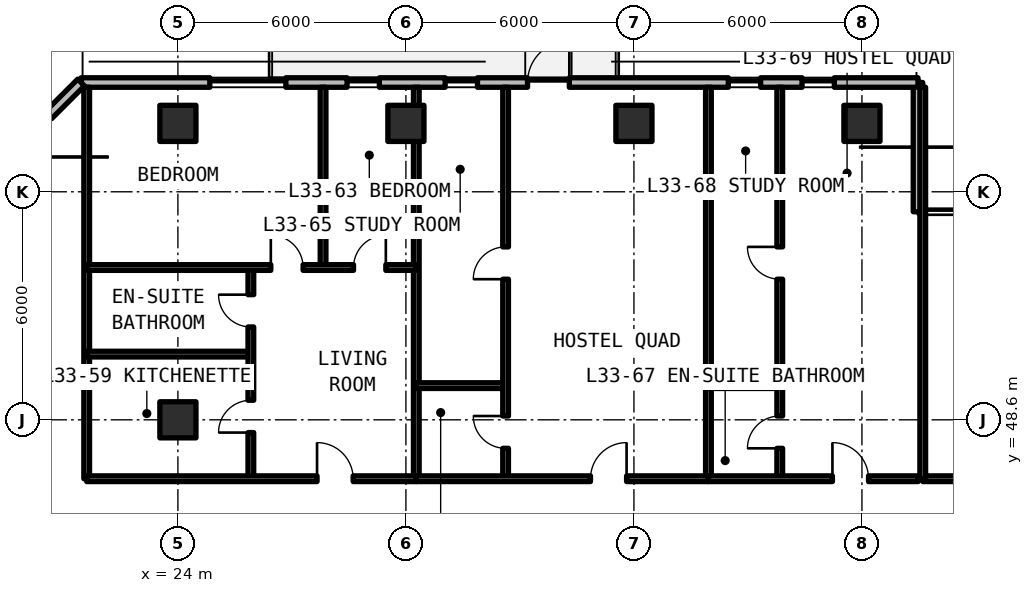
"""IFC4 building model, lengths in metres.
Left out: names, types, materials, properties, quantities, classifications, styles, units other than length and angle.
Written with IfcOpenShell. Run it as: python <this file> out.ifc"""

import sys

from ifc_helpers import new_model, si_unit, direction, frame, frame_2d, origin, origin_2d, place, context, subcontext, project, spatial, rectangle, extrude, element, fill, save


model = new_model("IFC4")
c1 = context("Model", 3, precision=1e-05, world=origin(), true_north=direction((0.0, 1.0)))
c2 = subcontext(c1, "Body", "Model", "MODEL_VIEW")
j1 = project(units=[si_unit("LENGTHUNIT", "METRE"), si_unit("PLANEANGLEUNIT", "RADIAN")], contexts=[c1])
p1 = place(None, origin())
s1 = spatial("IfcSite", under=j1, at=p1, CompositionType="ELEMENT")
p2 = place(p1, origin())
s2 = spatial("IfcBuilding", under=s1, at=p2, CompositionType="ELEMENT")
p3 = place(p2, frame((0.0, 0.0, 119.46)))
s3 = spatial("IfcBuildingStorey", under=s2, at=p3, CompositionType="ELEMENT", Elevation=119.46)
for number, where, z_axis, x_axis in (
    (1, (24.0, 48.6, 0.0), (0.0, 0.0, 1.0), (1.0, 0.0, 0.0)),
    (2, (24.0, 56.4, 0.0), (0.0, 0.0, 1.0), (1.0, 0.0, 0.0)),
    (3, (30.0, 56.4, 0.0), (0.0, 0.0, 1.0), (1.0, 0.0, 0.0)),
    (4, (36.0, 56.4, 0.0), (0.0, 0.0, 1.0), (1.0, 0.0, 0.0)),
    (5, (42.0, 56.4, 0.0), (0.0, 0.0, 1.0), (1.0, 0.0, 0.0)),
):
    element("IfcColumn", number, at=place(p3, frame(where, z_axis=z_axis, x_axis=x_axis)), inside=s3, PredefinedType="COLUMN", context=c2, shape_type="SweptSolid", body=[
        extrude(rectangle(XDim=0.95, YDim=0.95, at=origin_2d()), origin(), (0.0, 0.0, 1.0), 3.63),
    ])
p4 = place(p3, frame((43.475, 54.075, 0.0), z_axis=(0.0, 0.0, 1.0), x_axis=(0.0, 1.0, 0.0)))
e6 = element("IfcWall", 6, at=p4, inside=s3, PredefinedType="SOLIDWALL", context=c2, shape_type="SweptSolid", body=[
    extrude(rectangle(XDim=3.4, YDim=0.25, at=frame_2d((1.7, 0.0))), origin(), (0.0, 0.0, 1.0), 3.35),
])
p5 = place(p3, frame((43.475, 57.475, 0.0), z_axis=(0.0, 0.0, 1.0), x_axis=(-1.0, 0.0, 0.0)))
e7 = element("IfcWall", 7, at=p5, inside=s3, PredefinedType="SOLIDWALL", context=c2, shape_type="SweptSolid", body=[
    extrude(rectangle(XDim=22.023, YDim=0.25, at=frame_2d((11.012, 0.0))), origin(), (0.0, 0.0, 1.0), 3.35),
])
p6 = place(p5, frame((9.175, 0.0, 0.0)))
e8 = element("IfcOpeningElement", 8, at=p6, cuts=e7, PredefinedType="OPENING", context=c2, shape_type="SweptSolid", body=[
    extrude(rectangle(XDim=1.1, YDim=2.15, at=frame_2d((0.55, 1.075))), frame((0.0, 0.135, 0.0), z_axis=(0.0, -1.0, 0.0), x_axis=(1.0, 0.0, 0.0)), (0.0, 0.0, 1.0), 0.27),
])
p7 = place(p5, frame((16.635, 0.0, 0.78)))
e9 = element("IfcOpeningElement", 9, at=p7, cuts=e7, PredefinedType="OPENING", context=c2, shape_type="SweptSolid", body=[
    extrude(rectangle(XDim=2.0, YDim=1.66, at=frame_2d((1.0, 0.83))), frame((0.0, 0.135, 0.0), z_axis=(0.0, -1.0, 0.0), x_axis=(1.0, 0.0, 0.0)), (0.0, 0.0, 1.0), 0.27),
])
p8 = place(p5, frame((14.173, 0.0, 0.78)))
e10 = element("IfcOpeningElement", 10, at=p8, cuts=e7, PredefinedType="OPENING", context=c2, shape_type="SweptSolid", body=[
    extrude(rectangle(XDim=0.85, YDim=1.65, at=frame_2d((0.425, 0.825))), frame((0.0, 0.135, 0.0), z_axis=(0.0, -1.0, 0.0), x_axis=(1.0, 0.0, 0.0)), (0.0, 0.0, 1.0), 0.27),
])
p9 = place(p5, frame((11.592, 0.0, 0.78)))
e11 = element("IfcOpeningElement", 11, at=p9, cuts=e7, PredefinedType="OPENING", context=c2, shape_type="SweptSolid", body=[
    extrude(rectangle(XDim=0.85, YDim=1.65, at=frame_2d((0.425, 0.825))), frame((0.0, 0.135, 0.0), z_axis=(0.0, -1.0, 0.0), x_axis=(1.0, 0.0, 0.0)), (0.0, 0.0, 1.0), 0.27),
])
p10 = place(p5, frame((4.141, 0.0, 0.78)))
e12 = element("IfcOpeningElement", 12, at=p10, cuts=e7, PredefinedType="OPENING", context=c2, shape_type="SweptSolid", body=[
    extrude(rectangle(XDim=0.85, YDim=1.65, at=frame_2d((0.425, 0.825))), frame((0.0, 0.135, 0.0), z_axis=(0.0, -1.0, 0.0), x_axis=(1.0, 0.0, 0.0)), (0.0, 0.0, 1.0), 0.27),
])
p11 = place(p5, frame((2.201, 0.0, 0.78)))
e13 = element("IfcOpeningElement", 13, at=p11, cuts=e7, PredefinedType="OPENING", context=c2, shape_type="SweptSolid", body=[
    extrude(rectangle(XDim=0.85, YDim=1.65, at=frame_2d((0.425, 0.825))), frame((0.0, 0.135, 0.0), z_axis=(0.0, -1.0, 0.0), x_axis=(1.0, 0.0, 0.0)), (0.0, 0.0, 1.0), 0.27),
])
p12 = place(p3, frame((21.452, 57.475, 0.0), z_axis=(0.0, 0.0, 1.0), x_axis=(-0.707106781187, -0.707106781187, 0.0)))
e14 = element("IfcWall", 14, at=p12, inside=s3, PredefinedType="SOLIDWALL", context=c2, shape_type="SweptSolid", body=[
    extrude(rectangle(XDim=5.836, YDim=0.25, at=frame_2d((2.918, 0.0))), origin(), (0.0, 0.0, 1.0), 3.35),
])
p13 = place(p12, frame((1.218, 0.0, 0.78)))
e15 = element("IfcOpeningElement", 15, at=p13, cuts=e14, PredefinedType="OPENING", context=c2, shape_type="SweptSolid", body=[
    extrude(rectangle(XDim=3.4, YDim=1.66, at=frame_2d((1.7, 0.83))), frame((0.0, 0.135, 0.0), z_axis=(0.0, -1.0, 0.0), x_axis=(1.0, 0.0, 0.0)), (0.0, 0.0, 1.0), 0.27),
])
p14 = place(p3, frame((43.6, 47.05, 0.0), z_axis=(0.0, 0.0, 1.0), x_axis=(1.0, 0.0, 0.0)))
e16 = element("IfcWall", 16, at=p14, inside=s3, PredefinedType="SOLIDWALL", context=c2, shape_type="SweptSolid", body=[
    extrude(rectangle(XDim=8.4, YDim=0.15, at=frame_2d((4.2, 0.0))), origin(), (0.0, 0.0, 1.0), 2.57),
])
p15 = place(p14, frame((3.65, 0.0, 0.0)))
e17 = element("IfcOpeningElement", 17, at=p15, cuts=e16, PredefinedType="OPENING", context=c2, shape_type="SweptSolid", body=[
    extrude(rectangle(XDim=1.1, YDim=2.15, at=frame_2d((0.55, 1.075))), frame((0.0, 0.085, 0.0), z_axis=(0.0, -1.0, 0.0), x_axis=(1.0, 0.0, 0.0)), (0.0, 0.0, 1.0), 0.17),
])
for number, where, z_axis, x_axis in (
    (18, (43.6, 47.05, 0.0), (0.0, 0.0, 1.0), (0.0, 1.0, 0.0)),
    (19, (21.6, 47.05, 0.0), (0.0, 0.0, 1.0), (0.0, 1.0, 0.0)),
    (20, (30.273, 47.05, 0.0), (0.0, 0.0, 1.0), (0.0, 1.0, 0.0)),
):
    element("IfcWall", number, at=place(p3, frame(where, z_axis=z_axis, x_axis=x_axis)), inside=s3, PredefinedType="SOLIDWALL", context=c2, shape_type="SweptSolid", body=[
        extrude(rectangle(XDim=10.3, YDim=0.15, at=frame_2d((5.15, 0.0))), origin(), (0.0, 0.0, 1.0), 2.57),
    ])
p16 = place(p3, frame((21.6, 50.329, 0.0), z_axis=(0.0, 0.0, 1.0), x_axis=(1.0, 0.0, 0.0)))
e21 = element("IfcWall", 21, at=p16, inside=s3, PredefinedType="PARTITIONING", context=c2, shape_type="SweptSolid", body=[
    extrude(rectangle(XDim=4.32, YDim=0.15, at=frame_2d((2.16, 0.0))), origin(), (0.0, 0.0, 1.0), 2.57),
])
p17 = place(p3, frame((25.92, 47.05, 0.0), z_axis=(0.0, 0.0, 1.0), x_axis=(0.0, 1.0, 0.0)))
e22 = element("IfcWall", 22, at=p17, inside=s3, PredefinedType="PARTITIONING", context=c2, shape_type="SweptSolid", body=[
    extrude(rectangle(XDim=5.557, YDim=0.15, at=frame_2d((2.779, 0.0))), origin(), (0.0, 0.0, 1.0), 2.57),
])
p18 = place(p17, frame((1.214, 0.0, 0.0)))
e23 = element("IfcOpeningElement", 23, at=p18, cuts=e22, PredefinedType="OPENING", context=c2, shape_type="SweptSolid", body=[
    extrude(rectangle(XDim=0.85, YDim=2.1, at=frame_2d((0.425, 1.05))), frame((0.0, 0.085, 0.0), z_axis=(0.0, -1.0, 0.0), x_axis=(1.0, 0.0, 0.0)), (0.0, 0.0, 1.0), 0.17),
])
p19 = place(p17, frame((3.993, 0.0, 0.0)))
e24 = element("IfcOpeningElement", 24, at=p19, cuts=e22, PredefinedType="OPENING", context=c2, shape_type="SweptSolid", body=[
    extrude(rectangle(XDim=0.85, YDim=2.1, at=frame_2d((0.425, 1.05))), frame((0.0, 0.085, 0.0), z_axis=(0.0, -1.0, 0.0), x_axis=(1.0, 0.0, 0.0)), (0.0, 0.0, 1.0), 0.17),
])
p20 = place(p3, frame((27.82, 52.607, 0.0), z_axis=(0.0, 0.0, 1.0), x_axis=(0.0, 1.0, 0.0)))
e25 = element("IfcWall", 25, at=p20, inside=s3, PredefinedType="PARTITIONING", context=c2, shape_type="SweptSolid", body=[
    extrude(rectangle(XDim=4.743, YDim=0.15, at=frame_2d((2.372, 0.0))), origin(), (0.0, 0.0, 1.0), 2.57),
])
p21 = place(p3, frame((21.6, 52.607, 0.0), z_axis=(0.0, 0.0, 1.0), x_axis=(1.0, 0.0, 0.0)))
e26 = element("IfcWall", 26, at=p21, inside=s3, PredefinedType="PARTITIONING", context=c2, shape_type="SweptSolid", body=[
    extrude(rectangle(XDim=8.673, YDim=0.15, at=frame_2d((4.336, 0.0))), origin(), (0.0, 0.0, 1.0), 2.57),
])
p22 = place(p21, frame((4.845, 0.0, 0.0)))
e27 = element("IfcOpeningElement", 27, at=p22, cuts=e26, PredefinedType="OPENING", context=c2, shape_type="SweptSolid", body=[
    extrude(rectangle(XDim=0.85, YDim=2.1, at=frame_2d((0.425, 1.05))), frame((0.0, 0.085, 0.0), z_axis=(0.0, -1.0, 0.0), x_axis=(1.0, 0.0, 0.0)), (0.0, 0.0, 1.0), 0.17),
])
p23 = place(p21, frame((7.021, 0.0, 0.0)))
e28 = element("IfcOpeningElement", 28, at=p23, cuts=e26, PredefinedType="OPENING", context=c2, shape_type="SweptSolid", body=[
    extrude(rectangle(XDim=0.85, YDim=2.1, at=frame_2d((0.425, 1.05))), frame((0.0, 0.085, 0.0), z_axis=(0.0, -1.0, 0.0), x_axis=(1.0, 0.0, 0.0)), (0.0, 0.0, 1.0), 0.17),
])
p24 = place(p3, frame((21.6, 47.05, 0.0), z_axis=(0.0, 0.0, 1.0), x_axis=(1.0, 0.0, 0.0)))
e29 = element("IfcWall", 29, at=p24, inside=s3, PredefinedType="SOLIDWALL", context=c2, shape_type="SweptSolid", body=[
    extrude(rectangle(XDim=8.673, YDim=0.15, at=frame_2d((4.336, 0.0))), origin(), (0.0, 0.0, 1.0), 2.57),
])
p25 = place(p24, frame((6.062, 0.0, 0.0)))
e30 = element("IfcOpeningElement", 30, at=p25, cuts=e29, PredefinedType="OPENING", context=c2, shape_type="SweptSolid", body=[
    extrude(rectangle(XDim=0.95, YDim=2.15, at=frame_2d((0.475, 1.075))), frame((0.0, 0.085, 0.0), z_axis=(0.0, -1.0, 0.0), x_axis=(1.0, 0.0, 0.0)), (0.0, 0.0, 1.0), 0.17),
])
p26 = place(p3, frame((37.961, 47.05, 0.0), z_axis=(0.0, 0.0, 1.0), x_axis=(0.0, 1.0, 0.0)))
e31 = element("IfcWall", 31, at=p26, inside=s3, PredefinedType="SOLIDWALL", context=c2, shape_type="SweptSolid", body=[
    extrude(rectangle(XDim=10.3, YDim=0.15, at=frame_2d((5.15, 0.0))), origin(), (0.0, 0.0, 1.0), 2.57),
])
p27 = place(p3, frame((30.273, 49.5, 0.0), z_axis=(0.0, 0.0, 1.0), x_axis=(1.0, 0.0, 0.0)))
e32 = element("IfcWall", 32, at=p27, inside=s3, PredefinedType="PARTITIONING", context=c2, shape_type="SweptSolid", body=[
    extrude(rectangle(XDim=2.35, YDim=0.15, at=frame_2d((1.175, 0.0))), origin(), (0.0, 0.0, 1.0), 2.57),
])
p28 = place(p3, frame((32.623, 47.05, 0.0), z_axis=(0.0, 0.0, 1.0), x_axis=(0.0, 1.0, 0.0)))
e33 = element("IfcWall", 33, at=p28, inside=s3, PredefinedType="PARTITIONING", context=c2, shape_type="SweptSolid", body=[
    extrude(rectangle(XDim=10.3, YDim=0.15, at=frame_2d((5.15, 0.0))), origin(), (0.0, 0.0, 1.0), 2.57),
])
p29 = place(p28, frame((0.8, 0.0, 0.0)))
e34 = element("IfcOpeningElement", 34, at=p29, cuts=e33, PredefinedType="OPENING", context=c2, shape_type="SweptSolid", body=[
    extrude(rectangle(XDim=0.85, YDim=2.1, at=frame_2d((0.425, 1.05))), frame((0.0, 0.085, 0.0), z_axis=(0.0, -1.0, 0.0), x_axis=(1.0, 0.0, 0.0)), (0.0, 0.0, 1.0), 0.17),
])
p30 = place(p28, frame((5.25, 0.0, 0.0)))
e35 = element("IfcOpeningElement", 35, at=p30, cuts=e33, PredefinedType="OPENING", context=c2, shape_type="SweptSolid", body=[
    extrude(rectangle(XDim=0.85, YDim=2.1, at=frame_2d((0.425, 1.05))), frame((0.0, 0.085, 0.0), z_axis=(0.0, -1.0, 0.0), x_axis=(1.0, 0.0, 0.0)), (0.0, 0.0, 1.0), 0.17),
])
p31 = place(p3, frame((30.273, 47.05, 0.0), z_axis=(0.0, 0.0, 1.0), x_axis=(1.0, 0.0, 0.0)))
e36 = element("IfcWall", 36, at=p31, inside=s3, PredefinedType="SOLIDWALL", context=c2, shape_type="SweptSolid", body=[
    extrude(rectangle(XDim=7.688, YDim=0.15, at=frame_2d((3.844, 0.0))), origin(), (0.0, 0.0, 1.0), 2.57),
])
p32 = place(p31, frame((4.584, 0.0, 0.0)))
e37 = element("IfcOpeningElement", 37, at=p32, cuts=e36, PredefinedType="OPENING", context=c2, shape_type="SweptSolid", body=[
    extrude(rectangle(XDim=0.95, YDim=2.15, at=frame_2d((0.475, 1.075))), frame((0.0, 0.085, 0.0), z_axis=(0.0, -1.0, 0.0), x_axis=(1.0, 0.0, 0.0)), (0.0, 0.0, 1.0), 0.17),
])
p33 = place(p3, frame((37.961, 49.5, 0.0), z_axis=(0.0, 0.0, 1.0), x_axis=(1.0, 0.0, 0.0)))
e38 = element("IfcWall", 38, at=p33, inside=s3, PredefinedType="PARTITIONING", context=c2, shape_type="SweptSolid", body=[
    extrude(rectangle(XDim=1.877, YDim=0.15, at=frame_2d((0.938, 0.0))), origin(), (0.0, 0.0, 1.0), 2.57),
])
p34 = place(p3, frame((39.837, 47.05, 0.0), z_axis=(0.0, 0.0, 1.0), x_axis=(0.0, 1.0, 0.0)))
e39 = element("IfcWall", 39, at=p34, inside=s3, PredefinedType="PARTITIONING", context=c2, shape_type="SweptSolid", body=[
    extrude(rectangle(XDim=10.3, YDim=0.15, at=frame_2d((5.15, 0.0))), origin(), (0.0, 0.0, 1.0), 2.57),
])
p35 = place(p34, frame((0.8, 0.0, 0.0)))
e40 = element("IfcOpeningElement", 40, at=p35, cuts=e39, PredefinedType="OPENING", context=c2, shape_type="SweptSolid", body=[
    extrude(rectangle(XDim=0.85, YDim=2.1, at=frame_2d((0.425, 1.05))), frame((0.0, 0.085, 0.0), z_axis=(0.0, -1.0, 0.0), x_axis=(1.0, 0.0, 0.0)), (0.0, 0.0, 1.0), 0.17),
])
p36 = place(p34, frame((5.25, 0.0, 0.0)))
e41 = element("IfcOpeningElement", 41, at=p36, cuts=e39, PredefinedType="OPENING", context=c2, shape_type="SweptSolid", body=[
    extrude(rectangle(XDim=0.85, YDim=2.1, at=frame_2d((0.425, 1.05))), frame((0.0, 0.085, 0.0), z_axis=(0.0, -1.0, 0.0), x_axis=(1.0, 0.0, 0.0)), (0.0, 0.0, 1.0), 0.17),
])
p37 = place(p3, frame((37.961, 47.05, 0.0), z_axis=(0.0, 0.0, 1.0), x_axis=(1.0, 0.0, 0.0)))
e42 = element("IfcWall", 42, at=p37, inside=s3, PredefinedType="SOLIDWALL", context=c2, shape_type="SweptSolid", body=[
    extrude(rectangle(XDim=5.519, YDim=0.15, at=frame_2d((2.76, 0.0))), origin(), (0.0, 0.0, 1.0), 2.57),
])
p38 = place(p37, frame((3.263, 0.0, 0.0)))
e43 = element("IfcOpeningElement", 43, at=p38, cuts=e42, PredefinedType="OPENING", context=c2, shape_type="SweptSolid", body=[
    extrude(rectangle(XDim=0.95, YDim=2.15, at=frame_2d((0.475, 1.075))), frame((0.0, 0.085, 0.0), z_axis=(0.0, -1.0, 0.0), x_axis=(1.0, 0.0, 0.0)), (0.0, 0.0, 1.0), 0.17),
])
p39 = place(p6, frame((1.1, 0.0, 0.0), z_axis=(0.0, 0.0, 1.0), x_axis=(-1.0, 0.0, 0.0)))
e44 = element("IfcDoor", 44, at=p39, inside=s3, OperationType="SINGLE_SWING_LEFT", PredefinedType="DOOR", context=c2, shape_type="SweptSolid", body=[
    extrude(rectangle(XDim=1.1, YDim=2.15, at=frame_2d((0.55, 1.075))), frame((0.0, 0.025, 0.0), z_axis=(0.0, -1.0, 0.0), x_axis=(1.0, 0.0, 0.0)), (0.0, 0.0, 1.0), 0.05),
])
fill(e8, e44)
p40 = place(p7, origin())
e45 = element("IfcWindow", 45, at=p40, inside=s3, PartitioningType="SINGLE_PANEL", PredefinedType="WINDOW", context=c2, shape_type="SweptSolid", body=[
    extrude(rectangle(XDim=2.0, YDim=1.66, at=frame_2d((1.0, 0.83))), frame((0.0, 0.03, 0.0), z_axis=(0.0, -1.0, 0.0), x_axis=(1.0, 0.0, 0.0)), (0.0, 0.0, 1.0), 0.06),
])
fill(e9, e45)
p41 = place(p8, origin())
e46 = element("IfcWindow", 46, at=p41, inside=s3, PartitioningType="SINGLE_PANEL", PredefinedType="WINDOW", context=c2, shape_type="SweptSolid", body=[
    extrude(rectangle(XDim=0.85, YDim=1.65, at=frame_2d((0.425, 0.825))), frame((0.0, 0.03, 0.0), z_axis=(0.0, -1.0, 0.0), x_axis=(1.0, 0.0, 0.0)), (0.0, 0.0, 1.0), 0.06),
])
fill(e10, e46)
p42 = place(p9, origin())
e47 = element("IfcWindow", 47, at=p42, inside=s3, PartitioningType="SINGLE_PANEL", PredefinedType="WINDOW", context=c2, shape_type="SweptSolid", body=[
    extrude(rectangle(XDim=0.85, YDim=1.65, at=frame_2d((0.425, 0.825))), frame((0.0, 0.03, 0.0), z_axis=(0.0, -1.0, 0.0), x_axis=(1.0, 0.0, 0.0)), (0.0, 0.0, 1.0), 0.06),
])
fill(e11, e47)
p43 = place(p10, origin())
e48 = element("IfcWindow", 48, at=p43, inside=s3, PartitioningType="SINGLE_PANEL", PredefinedType="WINDOW", context=c2, shape_type="SweptSolid", body=[
    extrude(rectangle(XDim=0.85, YDim=1.65, at=frame_2d((0.425, 0.825))), frame((0.0, 0.03, 0.0), z_axis=(0.0, -1.0, 0.0), x_axis=(1.0, 0.0, 0.0)), (0.0, 0.0, 1.0), 0.06),
])
fill(e12, e48)
p44 = place(p11, origin())
e49 = element("IfcWindow", 49, at=p44, inside=s3, PartitioningType="SINGLE_PANEL", PredefinedType="WINDOW", context=c2, shape_type="SweptSolid", body=[
    extrude(rectangle(XDim=0.85, YDim=1.65, at=frame_2d((0.425, 0.825))), frame((0.0, 0.03, 0.0), z_axis=(0.0, -1.0, 0.0), x_axis=(1.0, 0.0, 0.0)), (0.0, 0.0, 1.0), 0.06),
])
fill(e13, e49)
p45 = place(p18, origin())
e50 = element("IfcDoor", 50, at=p45, inside=s3, OperationType="SINGLE_SWING_LEFT", PredefinedType="DOOR", context=c2, shape_type="SweptSolid", body=[
    extrude(rectangle(XDim=0.85, YDim=2.1, at=frame_2d((0.425, 1.05))), frame((0.0, 0.025, 0.0), z_axis=(0.0, -1.0, 0.0), x_axis=(1.0, 0.0, 0.0)), (0.0, 0.0, 1.0), 0.05),
])
fill(e23, e50)
p46 = place(p19, origin())
e51 = element("IfcDoor", 51, at=p46, inside=s3, OperationType="SINGLE_SWING_RIGHT", PredefinedType="DOOR", context=c2, shape_type="SweptSolid", body=[
    extrude(rectangle(XDim=0.85, YDim=2.1, at=frame_2d((0.425, 1.05))), frame((0.0, 0.025, 0.0), z_axis=(0.0, -1.0, 0.0), x_axis=(1.0, 0.0, 0.0)), (0.0, 0.0, 1.0), 0.05),
])
fill(e24, e51)
p47 = place(p22, origin())
e52 = element("IfcDoor", 52, at=p47, inside=s3, OperationType="SINGLE_SWING_LEFT", PredefinedType="DOOR", context=c2, shape_type="SweptSolid", body=[
    extrude(rectangle(XDim=0.85, YDim=2.1, at=frame_2d((0.425, 1.05))), frame((0.0, 0.025, 0.0), z_axis=(0.0, -1.0, 0.0), x_axis=(1.0, 0.0, 0.0)), (0.0, 0.0, 1.0), 0.05),
])
fill(e27, e52)
p48 = place(p23, origin())
e53 = element("IfcDoor", 53, at=p48, inside=s3, OperationType="SINGLE_SWING_RIGHT", PredefinedType="DOOR", context=c2, shape_type="SweptSolid", body=[
    extrude(rectangle(XDim=0.85, YDim=2.1, at=frame_2d((0.425, 1.05))), frame((0.0, 0.025, 0.0), z_axis=(0.0, -1.0, 0.0), x_axis=(1.0, 0.0, 0.0)), (0.0, 0.0, 1.0), 0.05),
])
fill(e28, e53)
p49 = place(p25, origin())
e54 = element("IfcDoor", 54, at=p49, inside=s3, OperationType="SINGLE_SWING_LEFT", PredefinedType="DOOR", context=c2, shape_type="SweptSolid", body=[
    extrude(rectangle(XDim=0.95, YDim=2.15, at=frame_2d((0.475, 1.075))), frame((0.0, 0.025, 0.0), z_axis=(0.0, -1.0, 0.0), x_axis=(1.0, 0.0, 0.0)), (0.0, 0.0, 1.0), 0.05),
])
fill(e30, e54)
p50 = place(p29, origin())
e55 = element("IfcDoor", 55, at=p50, inside=s3, OperationType="SINGLE_SWING_RIGHT", PredefinedType="DOOR", context=c2, shape_type="SweptSolid", body=[
    extrude(rectangle(XDim=0.85, YDim=2.1, at=frame_2d((0.425, 1.05))), frame((0.0, 0.025, 0.0), z_axis=(0.0, -1.0, 0.0), x_axis=(1.0, 0.0, 0.0)), (0.0, 0.0, 1.0), 0.05),
])
fill(e34, e55)
p51 = place(p30, origin())
e56 = element("IfcDoor", 56, at=p51, inside=s3, OperationType="SINGLE_SWING_LEFT", PredefinedType="DOOR", context=c2, shape_type="SweptSolid", body=[
    extrude(rectangle(XDim=0.85, YDim=2.1, at=frame_2d((0.425, 1.05))), frame((0.0, 0.025, 0.0), z_axis=(0.0, -1.0, 0.0), x_axis=(1.0, 0.0, 0.0)), (0.0, 0.0, 1.0), 0.05),
])
fill(e35, e56)
p52 = place(p32, origin())
e57 = element("IfcDoor", 57, at=p52, inside=s3, OperationType="SINGLE_SWING_RIGHT", PredefinedType="DOOR", context=c2, shape_type="SweptSolid", body=[
    extrude(rectangle(XDim=0.95, YDim=2.15, at=frame_2d((0.475, 1.075))), frame((0.0, 0.025, 0.0), z_axis=(0.0, -1.0, 0.0), x_axis=(1.0, 0.0, 0.0)), (0.0, 0.0, 1.0), 0.05),
])
fill(e37, e57)
p53 = place(p35, origin())
e58 = element("IfcDoor", 58, at=p53, inside=s3, OperationType="SINGLE_SWING_LEFT", PredefinedType="DOOR", context=c2, shape_type="SweptSolid", body=[
    extrude(rectangle(XDim=0.85, YDim=2.1, at=frame_2d((0.425, 1.05))), frame((0.0, 0.025, 0.0), z_axis=(0.0, -1.0, 0.0), x_axis=(1.0, 0.0, 0.0)), (0.0, 0.0, 1.0), 0.05),
])
fill(e40, e58)
p54 = place(p36, origin())
e59 = element("IfcDoor", 59, at=p54, inside=s3, OperationType="SINGLE_SWING_RIGHT", PredefinedType="DOOR", context=c2, shape_type="SweptSolid", body=[
    extrude(rectangle(XDim=0.85, YDim=2.1, at=frame_2d((0.425, 1.05))), frame((0.0, 0.025, 0.0), z_axis=(0.0, -1.0, 0.0), x_axis=(1.0, 0.0, 0.0)), (0.0, 0.0, 1.0), 0.05),
])
fill(e41, e59)
p55 = place(p38, origin())
e60 = element("IfcDoor", 60, at=p55, inside=s3, OperationType="SINGLE_SWING_LEFT", PredefinedType="DOOR", context=c2, shape_type="SweptSolid", body=[
    extrude(rectangle(XDim=0.95, YDim=2.15, at=frame_2d((0.475, 1.075))), frame((0.0, 0.025, 0.0), z_axis=(0.0, -1.0, 0.0), x_axis=(1.0, 0.0, 0.0)), (0.0, 0.0, 1.0), 0.05),
])
fill(e43, e60)
save(model, sys.argv[1])
